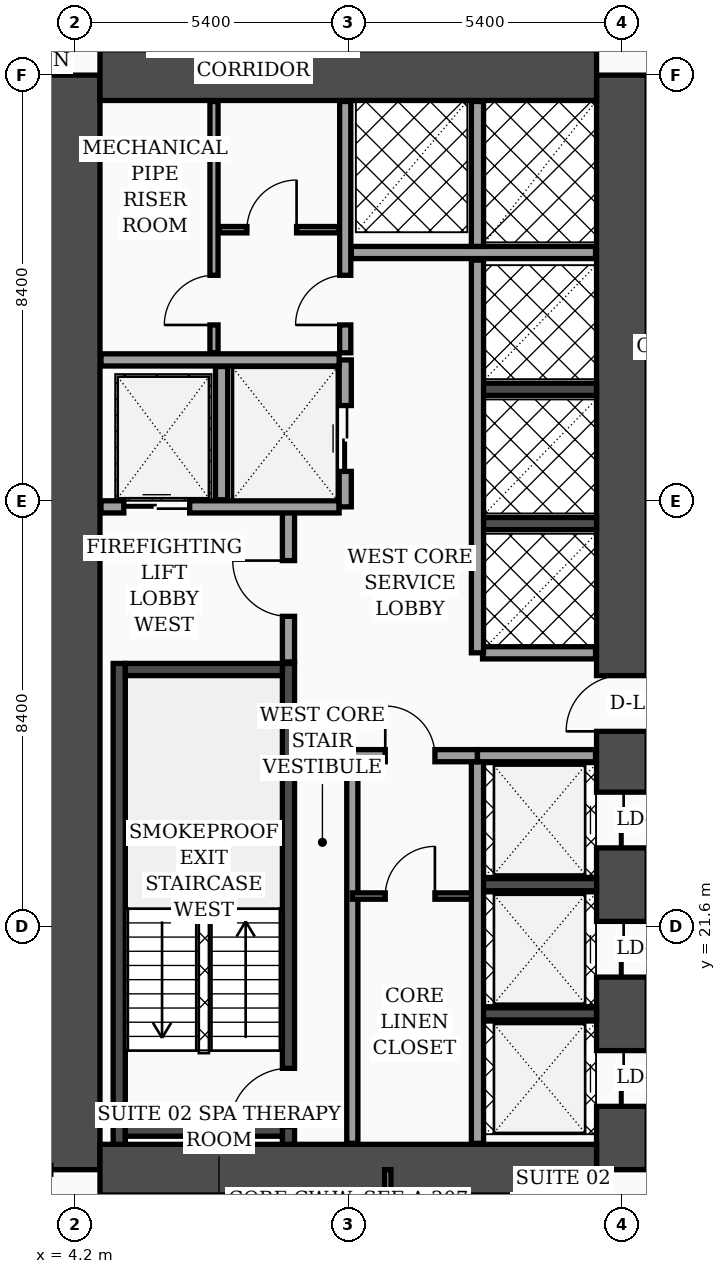
"""IFC4 building model, lengths in metres.
Left out: names, types, materials, properties, quantities, classifications, styles, units other than length and angle.
Written with IfcOpenShell. Run it as: python <this file> out.ifc"""

import sys

from ifc_helpers import new_model, si_unit, direction, frame, frame_2d, origin, place, context, subcontext, project, spatial, rectangle, extrude, element, fill, save


model = new_model("IFC4")
c1 = context("Model", 3, precision=1e-05, world=origin(), true_north=direction((0.0, 1.0)))
c2 = subcontext(c1, "Body", "Model", "MODEL_VIEW")
j1 = project(units=[si_unit("LENGTHUNIT", "METRE"), si_unit("PLANEANGLEUNIT", "RADIAN")], contexts=[c1])
p1 = place(None, origin())
s1 = spatial("IfcSite", under=j1, at=p1, CompositionType="ELEMENT")
p2 = place(p1, origin())
s2 = spatial("IfcBuilding", under=s1, at=p2, CompositionType="ELEMENT")
p3 = place(p2, frame((0.0, 0.0, 69.8)))
s3 = spatial("IfcBuildingStorey", under=s2, at=p3, CompositionType="ELEMENT", Elevation=69.8)
p4 = place(p3, frame((4.2, 16.8, 0.0), z_axis=(0.0, 0.0, 1.0), x_axis=(0.0, 1.0, 0.0)))
e1 = element("IfcWall", 1, at=p4, inside=s3, PredefinedType="SHEAR", context=c2, shape_type="SweptSolid", body=[
    extrude(rectangle(XDim=21.6, YDim=1.0, at=frame_2d((10.8, 0.0))), origin(), (0.0, 0.0, 1.0), 3.56),
])
p5 = place(p3, frame((15.0, 16.8, 0.0), z_axis=(0.0, 0.0, 1.0), x_axis=(0.0, 1.0, 0.0)))
e2 = element("IfcWall", 2, at=p5, inside=s3, PredefinedType="SHEAR", context=c2, shape_type="SweptSolid", body=[
    extrude(rectangle(XDim=21.6, YDim=1.0, at=frame_2d((10.8, 0.0))), origin(), (0.0, 0.0, 1.0), 3.56),
])
p6 = place(p5, frame((8.65, 0.0, 0.0)))
e3 = element("IfcOpeningElement", 3, at=p6, cuts=e2, PredefinedType="OPENING", context=c2, shape_type="SweptSolid", body=[
    extrude(rectangle(XDim=1.1, YDim=2.2, at=frame_2d((0.55, 1.1))), frame((0.0, 0.51, 0.0), z_axis=(0.0, -1.0, 0.0), x_axis=(1.0, 0.0, 0.0)), (0.0, 0.0, 1.0), 1.02),
])
p7 = place(p5, frame((1.25, 0.0, 0.0)))
e4 = element("IfcOpeningElement", 4, at=p7, cuts=e2, PredefinedType="OPENING", context=c2, shape_type="SweptSolid", body=[
    extrude(rectangle(XDim=1.1, YDim=2.2, at=frame_2d((0.55, 1.1))), frame((0.0, 0.51, 0.0), z_axis=(0.0, -1.0, 0.0), x_axis=(1.0, 0.0, 0.0)), (0.0, 0.0, 1.0), 1.02),
])
p8 = place(p5, frame((3.8, 0.0, 0.0)))
e5 = element("IfcOpeningElement", 5, at=p8, cuts=e2, PredefinedType="OPENING", context=c2, shape_type="SweptSolid", body=[
    extrude(rectangle(XDim=1.1, YDim=2.2, at=frame_2d((0.55, 1.1))), frame((0.0, 0.51, 0.0), z_axis=(0.0, -1.0, 0.0), x_axis=(1.0, 0.0, 0.0)), (0.0, 0.0, 1.0), 1.02),
])
p9 = place(p5, frame((6.35, 0.0, 0.0)))
e6 = element("IfcOpeningElement", 6, at=p9, cuts=e2, PredefinedType="OPENING", context=c2, shape_type="SweptSolid", body=[
    extrude(rectangle(XDim=1.1, YDim=2.2, at=frame_2d((0.55, 1.1))), frame((0.0, 0.51, 0.0), z_axis=(0.0, -1.0, 0.0), x_axis=(1.0, 0.0, 0.0)), (0.0, 0.0, 1.0), 1.02),
])
for number, where, z_axis, x_axis in (
    (7, (4.7, 38.4, 0.0), (0.0, 0.0, 1.0), (1.0, 0.0, 0.0)),
    (8, (4.7, 16.8, 0.0), (0.0, 0.0, 1.0), (1.0, 0.0, 0.0)),
):
    element("IfcWall", number, at=place(p3, frame(where, z_axis=z_axis, x_axis=x_axis)), inside=s3, PredefinedType="SHEAR", context=c2, shape_type="SweptSolid", body=[
        extrude(rectangle(XDim=9.8, YDim=1.0, at=frame_2d((4.9, 0.0))), origin(), (0.0, 0.0, 1.0), 3.56),
    ])
p10 = place(p3, frame((5.08, 17.3, 0.0), z_axis=(0.0, 0.0, 1.0), x_axis=(0.0, 1.0, 0.0)))
e9 = element("IfcWall", 9, at=p10, inside=s3, PredefinedType="SOLIDWALL", context=c2, shape_type="SweptSolid", body=[
    extrude(rectangle(XDim=9.49, YDim=0.24, at=frame_2d((4.745, 0.0))), origin(), (0.0, 0.0, 1.0), 3.56),
])
p11 = place(p3, frame((8.42, 17.3, 0.0), z_axis=(0.0, 0.0, 1.0), x_axis=(0.0, 1.0, 0.0)))
e10 = element("IfcWall", 10, at=p11, inside=s3, PredefinedType="SOLIDWALL", context=c2, shape_type="SweptSolid", body=[
    extrude(rectangle(XDim=9.49, YDim=0.24, at=frame_2d((4.745, 0.0))), origin(), (0.0, 0.0, 1.0), 3.56),
])
p12 = place(p11, frame((0.35, 0.0, 0.0)))
e11 = element("IfcOpeningElement", 11, at=p12, cuts=e10, PredefinedType="OPENING", context=c2, shape_type="SweptSolid", body=[
    extrude(rectangle(XDim=1.15, YDim=2.2, at=frame_2d((0.575, 1.1))), frame((0.0, 0.13, 0.0), z_axis=(0.0, -1.0, 0.0), x_axis=(1.0, 0.0, 0.0)), (0.0, 0.0, 1.0), 0.26),
])
for number, where, z_axis, x_axis in (
    (12, (5.2, 17.58, 0.0), (0.0, 0.0, 1.0), (1.0, 0.0, 0.0)),
    (13, (5.2, 26.67, 0.0), (0.0, 0.0, 1.0), (1.0, 0.0, 0.0)),
):
    element("IfcWall", number, at=place(p3, frame(where, z_axis=z_axis, x_axis=x_axis)), inside=s3, PredefinedType="SOLIDWALL", context=c2, shape_type="SweptSolid", body=[
        extrude(rectangle(XDim=3.1, YDim=0.24, at=frame_2d((1.55, 0.0))), origin(), (0.0, 0.0, 1.0), 3.56),
    ])
for number, where, z_axis, x_axis in (
    (14, (12.18, 19.875, 0.0), (0.0, 0.0, 1.0), (1.0, 0.0, 0.0)),
    (15, (12.18, 22.425, 0.0), (0.0, 0.0, 1.0), (1.0, 0.0, 0.0)),
    (16, (12.18, 29.55, 0.0), (0.0, 0.0, 1.0), (1.0, 0.0, 0.0)),
    (17, (12.18, 32.2, 0.0), (0.0, 0.0, 1.0), (1.0, 0.0, 0.0)),
):
    element("IfcWall", number, at=place(p3, frame(where, z_axis=z_axis, x_axis=x_axis)), inside=s3, PredefinedType="SOLIDWALL", context=c2, shape_type="SweptSolid", body=[
        extrude(rectangle(XDim=2.32, YDim=0.24, at=frame_2d((1.16, 0.0))), origin(), (0.0, 0.0, 1.0), 3.56),
    ])
p13 = place(p3, frame((8.42, 26.82, 0.0), z_axis=(0.0, 0.0, 1.0), x_axis=(0.0, 1.0, 0.0)))
e18 = element("IfcWall", 18, at=p13, inside=s3, PredefinedType="SOLIDWALL", context=c2, shape_type="SweptSolid", body=[
    extrude(rectangle(XDim=3.0, YDim=0.24, at=frame_2d((1.5, 0.0))), origin(), (0.0, 0.0, 1.0), 3.56),
])
p14 = place(p13, frame((0.9, 0.0, 0.0)))
e19 = element("IfcOpeningElement", 19, at=p14, cuts=e18, PredefinedType="OPENING", context=c2, shape_type="SweptSolid", body=[
    extrude(rectangle(XDim=1.1, YDim=2.2, at=frame_2d((0.55, 1.1))), frame((0.0, 0.13, 0.0), z_axis=(0.0, -1.0, 0.0), x_axis=(1.0, 0.0, 0.0)), (0.0, 0.0, 1.0), 0.26),
])
p15 = place(p3, frame((4.72, 29.88, 0.0), z_axis=(0.0, 0.0, 1.0), x_axis=(1.0, 0.0, 0.0)))
e20 = element("IfcWall", 20, at=p15, inside=s3, PredefinedType="SOLIDWALL", context=c2, shape_type="SweptSolid", body=[
    extrude(rectangle(XDim=4.7, YDim=0.24, at=frame_2d((2.35, 0.0))), origin(), (0.0, 0.0, 1.0), 3.56),
])
p16 = place(p15, frame((0.45, 0.0, 0.0)))
e21 = element("IfcOpeningElement", 21, at=p16, cuts=e20, PredefinedType="OPENING", context=c2, shape_type="SweptSolid", body=[
    extrude(rectangle(XDim=1.3, YDim=2.35, at=frame_2d((0.65, 1.175))), frame((0.0, 0.13, 0.0), z_axis=(0.0, -1.0, 0.0), x_axis=(1.0, 0.0, 0.0)), (0.0, 0.0, 1.0), 0.26),
])
p17 = place(p3, frame((7.1, 30.02, 0.0), z_axis=(0.0, 0.0, 1.0), x_axis=(0.0, 1.0, 0.0)))
e22 = element("IfcWall", 22, at=p17, inside=s3, PredefinedType="SOLIDWALL", context=c2, shape_type="SweptSolid", body=[
    extrude(rectangle(XDim=2.63, YDim=0.24, at=frame_2d((1.315, 0.0))), origin(), (0.0, 0.0, 1.0), 3.56),
])
p18 = place(p3, frame((9.54, 29.88, 0.0), z_axis=(0.0, 0.0, 1.0), x_axis=(0.0, 1.0, 0.0)))
e23 = element("IfcWall", 23, at=p18, inside=s3, PredefinedType="SOLIDWALL", context=c2, shape_type="SweptSolid", body=[
    extrude(rectangle(XDim=2.9, YDim=0.24, at=frame_2d((1.45, 0.0))), origin(), (0.0, 0.0, 1.0), 3.56),
])
p19 = place(p18, frame((0.7, 0.0, 0.0)))
e24 = element("IfcOpeningElement", 24, at=p19, cuts=e23, PredefinedType="OPENING", context=c2, shape_type="SweptSolid", body=[
    extrude(rectangle(XDim=1.3, YDim=2.35, at=frame_2d((0.65, 1.175))), frame((0.0, 0.13, 0.0), z_axis=(0.0, -1.0, 0.0), x_axis=(1.0, 0.0, 0.0)), (0.0, 0.0, 1.0), 0.26),
])
p20 = place(p3, frame((4.72, 32.78, 0.0), z_axis=(0.0, 0.0, 1.0), x_axis=(1.0, 0.0, 0.0)))
e25 = element("IfcWall", 25, at=p20, inside=s3, PredefinedType="SOLIDWALL", context=c2, shape_type="SweptSolid", body=[
    extrude(rectangle(XDim=4.7, YDim=0.24, at=frame_2d((2.35, 0.0))), origin(), (0.0, 0.0, 1.0), 3.56),
])
p21 = place(p3, frame((9.68, 17.32, 0.0), z_axis=(0.0, 0.0, 1.0), x_axis=(0.0, 1.0, 0.0)))
e26 = element("IfcWall", 26, at=p21, inside=s3, PredefinedType="SOLIDWALL", context=c2, shape_type="SweptSolid", body=[
    extrude(rectangle(XDim=7.68, YDim=0.22, at=frame_2d((3.84, 0.0))), origin(), (0.0, 0.0, 1.0), 3.56),
])
p22 = place(p3, frame((6.95, 32.92, 0.0), z_axis=(0.0, 0.0, 1.0), x_axis=(0.0, 1.0, 0.0)))
e27 = element("IfcWall", 27, at=p22, inside=s3, PredefinedType="PARTITIONING", context=c2, shape_type="SweptSolid", body=[
    extrude(rectangle(XDim=4.96, YDim=0.16, at=frame_2d((2.48, 0.0))), origin(), (0.0, 0.0, 1.0), 3.56),
])
p23 = place(p22, frame((0.55, 0.0, 0.0)))
e28 = element("IfcOpeningElement", 28, at=p23, cuts=e27, PredefinedType="OPENING", context=c2, shape_type="SweptSolid", body=[
    extrude(rectangle(XDim=0.98, YDim=2.15, at=frame_2d((0.49, 1.075))), frame((0.0, 0.09, 0.0), z_axis=(0.0, -1.0, 0.0), x_axis=(1.0, 0.0, 0.0)), (0.0, 0.0, 1.0), 0.18),
])
p24 = place(p3, frame((7.05, 35.35, 0.0), z_axis=(0.0, 0.0, 1.0), x_axis=(1.0, 0.0, 0.0)))
e29 = element("IfcWall", 29, at=p24, inside=s3, PredefinedType="PARTITIONING", context=c2, shape_type="SweptSolid", body=[
    extrude(rectangle(XDim=2.37, YDim=0.125, at=frame_2d((1.185, 0.0))), origin(), (0.0, 0.0, 1.0), 3.56),
])
p25 = place(p24, frame((0.55, 0.0, 0.0)))
e30 = element("IfcOpeningElement", 30, at=p25, cuts=e29, PredefinedType="OPENING", context=c2, shape_type="SweptSolid", body=[
    extrude(rectangle(XDim=0.98, YDim=2.15, at=frame_2d((0.49, 1.075))), frame((0.0, 0.073, 0.0), z_axis=(0.0, -1.0, 0.0), x_axis=(1.0, 0.0, 0.0)), (0.0, 0.0, 1.0), 0.145),
])
p26 = place(p3, frame((9.54, 32.92, 0.0), z_axis=(0.0, 0.0, 1.0), x_axis=(0.0, 1.0, 0.0)))
e31 = element("IfcWall", 31, at=p26, inside=s3, PredefinedType="SOLIDWALL", context=c2, shape_type="SweptSolid", body=[
    extrude(rectangle(XDim=4.96, YDim=0.22, at=frame_2d((2.48, 0.0))), origin(), (0.0, 0.0, 1.0), 3.56),
])
p27 = place(p26, frame((0.55, 0.0, 0.0)))
e32 = element("IfcOpeningElement", 32, at=p27, cuts=e31, PredefinedType="OPENING", context=c2, shape_type="SweptSolid", body=[
    extrude(rectangle(XDim=0.98, YDim=2.15, at=frame_2d((0.49, 1.075))), frame((0.0, 0.12, 0.0), z_axis=(0.0, -1.0, 0.0), x_axis=(1.0, 0.0, 0.0)), (0.0, 0.0, 1.0), 0.24),
])
p28 = place(p3, frame((9.68, 22.2, 0.0), z_axis=(0.0, 0.0, 1.0), x_axis=(1.0, 0.0, 0.0)))
e33 = element("IfcWall", 33, at=p28, inside=s3, PredefinedType="PARTITIONING", context=c2, shape_type="SweptSolid", body=[
    extrude(rectangle(XDim=2.47, YDim=0.125, at=frame_2d((1.235, 0.0))), origin(), (0.0, 0.0, 1.0), 3.56),
])
p29 = place(p28, frame((0.65, 0.0, 0.0)))
e34 = element("IfcOpeningElement", 34, at=p29, cuts=e33, PredefinedType="OPENING", context=c2, shape_type="SweptSolid", body=[
    extrude(rectangle(XDim=0.98, YDim=2.15, at=frame_2d((0.49, 1.075))), frame((0.0, 0.073, 0.0), z_axis=(0.0, -1.0, 0.0), x_axis=(1.0, 0.0, 0.0)), (0.0, 0.0, 1.0), 0.145),
])
p30 = place(p3, frame((12.15, 17.32, 0.0), z_axis=(0.0, 0.0, 1.0), x_axis=(0.0, 1.0, 0.0)))
e35 = element("IfcWall", 35, at=p30, inside=s3, PredefinedType="SOLIDWALL", context=c2, shape_type="SweptSolid", body=[
    extrude(rectangle(XDim=7.65, YDim=0.24, at=frame_2d((3.825, 0.0))), origin(), (0.0, 0.0, 1.0), 3.56),
])
p31 = place(p3, frame((9.68, 24.97, 0.0), z_axis=(0.0, 0.0, 1.0), x_axis=(1.0, 0.0, 0.0)))
e36 = element("IfcWall", 36, at=p31, inside=s3, PredefinedType="SOLIDWALL", context=c2, shape_type="SweptSolid", body=[
    extrude(rectangle(XDim=2.47, YDim=0.24, at=frame_2d((1.235, 0.0))), origin(), (0.0, 0.0, 1.0), 3.56),
])
p32 = place(p31, frame((0.65, 0.0, 0.0)))
e37 = element("IfcOpeningElement", 37, at=p32, cuts=e36, PredefinedType="OPENING", context=c2, shape_type="SweptSolid", body=[
    extrude(rectangle(XDim=0.98, YDim=2.15, at=frame_2d((0.49, 1.075))), frame((0.0, 0.13, 0.0), z_axis=(0.0, -1.0, 0.0), x_axis=(1.0, 0.0, 0.0)), (0.0, 0.0, 1.0), 0.26),
])
p33 = place(p3, frame((12.15, 24.97, 0.0), z_axis=(0.0, 0.0, 1.0), x_axis=(1.0, 0.0, 0.0)))
e38 = element("IfcWall", 38, at=p33, inside=s3, PredefinedType="SOLIDWALL", context=c2, shape_type="SweptSolid", body=[
    extrude(rectangle(XDim=2.33, YDim=0.24, at=frame_2d((1.165, 0.0))), origin(), (0.0, 0.0, 1.0), 2.84),
])
p34 = place(p3, frame((12.25, 27.0, 0.0), z_axis=(0.0, 0.0, 1.0), x_axis=(1.0, 0.0, 0.0)))
e39 = element("IfcWall", 39, at=p34, inside=s3, PredefinedType="SOLIDWALL", context=c2, shape_type="SweptSolid", body=[
    extrude(rectangle(XDim=2.23, YDim=0.24, at=frame_2d((1.115, 0.0))), origin(), (0.0, 0.0, 1.0), 3.56),
])
p35 = place(p3, frame((12.15, 27.0, 0.0), z_axis=(0.0, 0.0, 1.0), x_axis=(0.0, 1.0, 0.0)))
e40 = element("IfcWall", 40, at=p35, inside=s3, PredefinedType="SOLIDWALL", context=c2, shape_type="SweptSolid", body=[
    extrude(rectangle(XDim=7.75, YDim=0.24, at=frame_2d((3.875, 0.0))), origin(), (0.0, 0.0, 1.0), 3.56),
])
p36 = place(p3, frame((9.66, 34.9, 0.0), z_axis=(0.0, 0.0, 1.0), x_axis=(1.0, 0.0, 0.0)))
e41 = element("IfcWall", 41, at=p36, inside=s3, PredefinedType="SOLIDWALL", context=c2, shape_type="SweptSolid", body=[
    extrude(rectangle(XDim=4.82, YDim=0.24, at=frame_2d((2.41, 0.0))), origin(), (0.0, 0.0, 1.0), 3.56),
])
p37 = place(p3, frame((12.15, 35.02, 0.0), z_axis=(0.0, 0.0, 1.0), x_axis=(0.0, 1.0, 0.0)))
e42 = element("IfcWall", 42, at=p37, inside=s3, PredefinedType="SOLIDWALL", context=c2, shape_type="SweptSolid", body=[
    extrude(rectangle(XDim=2.86, YDim=0.24, at=frame_2d((1.43, 0.0))), origin(), (0.0, 0.0, 1.0), 3.56),
])
p38 = place(p3, frame((10.38, 14.71, 0.0), z_axis=(0.0, 0.0, 1.0), x_axis=(0.0, 1.0, 0.0)))
e43 = element("IfcWall", 43, at=p38, inside=s3, PredefinedType="PARTITIONING", context=c2, shape_type="SweptSolid", body=[
    extrude(rectangle(XDim=2.09, YDim=0.125, at=frame_2d((1.045, 0.0))), origin(), (0.0, 0.0, 1.0), 3.56),
])
p39 = place(p3, frame((13.3, 2.44, 0.0), z_axis=(0.0, 0.0, 1.0), x_axis=(0.0, 1.0, 0.0)))
e44 = element("IfcWall", 44, at=p39, inside=s3, PredefinedType="PARTITIONING", context=c2, shape_type="SweptSolid", body=[
    extrude(rectangle(XDim=14.36, YDim=0.18, at=frame_2d((7.18, 0.0))), origin(), (0.0, 0.0, 1.0), 3.04),
])
p40 = place(p39, frame((3.01, 0.0, 0.0)))
e45 = element("IfcOpeningElement", 45, at=p40, cuts=e44, PredefinedType="OPENING", context=c2, shape_type="SweptSolid", body=[
    extrude(rectangle(XDim=1.02, YDim=2.2, at=frame_2d((0.51, 1.1))), frame((0.0, 0.1, 0.0), z_axis=(0.0, -1.0, 0.0), x_axis=(1.0, 0.0, 0.0)), (0.0, 0.0, 1.0), 0.2),
])
p41 = place(p39, frame((9.03, 0.0, 0.0)))
e46 = element("IfcOpeningElement", 46, at=p41, cuts=e44, PredefinedType="OPENING", context=c2, shape_type="SweptSolid", body=[
    extrude(rectangle(XDim=1.02, YDim=2.2, at=frame_2d((0.51, 1.1))), frame((0.0, 0.1, 0.0), z_axis=(0.0, -1.0, 0.0), x_axis=(1.0, 0.0, 0.0)), (0.0, 0.0, 1.0), 0.2),
])
p42 = place(p14, origin())
e47 = element("IfcDoor", 47, at=p42, inside=s3, OperationType="SINGLE_SWING_RIGHT", PredefinedType="DOOR", context=c2, shape_type="SweptSolid", body=[
    extrude(rectangle(XDim=1.1, YDim=2.2, at=frame_2d((0.55, 1.1))), frame((0.0, 0.025, 0.0), z_axis=(0.0, -1.0, 0.0), x_axis=(1.0, 0.0, 0.0)), (0.0, 0.0, 1.0), 0.05),
])
fill(e19, e47)
p43 = place(p16, origin())
e48 = element("IfcDoor", 48, at=p43, inside=s3, OperationType="DOUBLE_DOOR_SLIDING", PredefinedType="DOOR", context=c2, shape_type="SweptSolid", body=[
    extrude(rectangle(XDim=1.3, YDim=2.35, at=frame_2d((0.65, 1.175))), frame((0.0, 0.025, 0.0), z_axis=(0.0, -1.0, 0.0), x_axis=(1.0, 0.0, 0.0)), (0.0, 0.0, 1.0), 0.05),
])
fill(e21, e48)
p44 = place(p19, origin())
e49 = element("IfcDoor", 49, at=p44, inside=s3, OperationType="DOUBLE_DOOR_SLIDING", PredefinedType="DOOR", context=c2, shape_type="SweptSolid", body=[
    extrude(rectangle(XDim=1.3, YDim=2.35, at=frame_2d((0.65, 1.175))), frame((0.0, 0.025, 0.0), z_axis=(0.0, -1.0, 0.0), x_axis=(1.0, 0.0, 0.0)), (0.0, 0.0, 1.0), 0.05),
])
fill(e24, e49)
p45 = place(p23, origin())
e50 = element("IfcDoor", 50, at=p45, inside=s3, OperationType="SINGLE_SWING_LEFT", PredefinedType="DOOR", context=c2, shape_type="SweptSolid", body=[
    extrude(rectangle(XDim=0.98, YDim=2.15, at=frame_2d((0.49, 1.075))), frame((0.0, 0.025, 0.0), z_axis=(0.0, -1.0, 0.0), x_axis=(1.0, 0.0, 0.0)), (0.0, 0.0, 1.0), 0.05),
])
fill(e28, e50)
p46 = place(p25, origin())
e51 = element("IfcDoor", 51, at=p46, inside=s3, OperationType="SINGLE_SWING_RIGHT", PredefinedType="DOOR", context=c2, shape_type="SweptSolid", body=[
    extrude(rectangle(XDim=0.98, YDim=2.15, at=frame_2d((0.49, 1.075))), frame((0.0, 0.025, 0.0), z_axis=(0.0, -1.0, 0.0), x_axis=(1.0, 0.0, 0.0)), (0.0, 0.0, 1.0), 0.05),
])
fill(e30, e51)
p47 = place(p27, origin())
e52 = element("IfcDoor", 52, at=p47, inside=s3, OperationType="SINGLE_SWING_LEFT", PredefinedType="DOOR", context=c2, shape_type="SweptSolid", body=[
    extrude(rectangle(XDim=0.98, YDim=2.15, at=frame_2d((0.49, 1.075))), frame((0.0, 0.025, 0.0), z_axis=(0.0, -1.0, 0.0), x_axis=(1.0, 0.0, 0.0)), (0.0, 0.0, 1.0), 0.05),
])
fill(e32, e52)
p48 = place(p29, origin())
e53 = element("IfcDoor", 53, at=p48, inside=s3, OperationType="SINGLE_SWING_RIGHT", PredefinedType="DOOR", context=c2, shape_type="SweptSolid", body=[
    extrude(rectangle(XDim=0.98, YDim=2.15, at=frame_2d((0.49, 1.075))), frame((0.0, 0.025, 0.0), z_axis=(0.0, -1.0, 0.0), x_axis=(1.0, 0.0, 0.0)), (0.0, 0.0, 1.0), 0.05),
])
fill(e34, e53)
p49 = place(p32, origin())
e54 = element("IfcDoor", 54, at=p49, inside=s3, OperationType="SINGLE_SWING_LEFT", PredefinedType="DOOR", context=c2, shape_type="SweptSolid", body=[
    extrude(rectangle(XDim=0.98, YDim=2.15, at=frame_2d((0.49, 1.075))), frame((0.0, 0.025, 0.0), z_axis=(0.0, -1.0, 0.0), x_axis=(1.0, 0.0, 0.0)), (0.0, 0.0, 1.0), 0.05),
])
fill(e37, e54)
p50 = place(p12, origin())
e55 = element("IfcDoor", 55, at=p50, inside=s3, OperationType="SINGLE_SWING_LEFT", PredefinedType="DOOR", context=c2, shape_type="SweptSolid", body=[
    extrude(rectangle(XDim=1.15, YDim=2.2, at=frame_2d((0.575, 1.1))), frame((0.0, 0.025, 0.0), z_axis=(0.0, -1.0, 0.0), x_axis=(1.0, 0.0, 0.0)), (0.0, 0.0, 1.0), 0.05),
])
fill(e11, e55)
p51 = place(p6, origin())
e56 = element("IfcDoor", 56, at=p51, inside=s3, OperationType="SINGLE_SWING_LEFT", PredefinedType="DOOR", context=c2, shape_type="SweptSolid", body=[
    extrude(rectangle(XDim=1.1, YDim=2.2, at=frame_2d((0.55, 1.1))), frame((0.0, 0.025, 0.0), z_axis=(0.0, -1.0, 0.0), x_axis=(1.0, 0.0, 0.0)), (0.0, 0.0, 1.0), 0.05),
])
fill(e3, e56)
p52 = place(p7, origin())
e57 = element("IfcDoor", 57, at=p52, inside=s3, OperationType="DOUBLE_DOOR_SLIDING", PredefinedType="DOOR", context=c2, shape_type="SweptSolid", body=[
    extrude(rectangle(XDim=1.1, YDim=2.2, at=frame_2d((0.55, 1.1))), frame((0.0, 0.025, 0.0), z_axis=(0.0, -1.0, 0.0), x_axis=(1.0, 0.0, 0.0)), (0.0, 0.0, 1.0), 0.05),
])
fill(e4, e57)
p53 = place(p8, origin())
e58 = element("IfcDoor", 58, at=p53, inside=s3, OperationType="DOUBLE_DOOR_SLIDING", PredefinedType="DOOR", context=c2, shape_type="SweptSolid", body=[
    extrude(rectangle(XDim=1.1, YDim=2.2, at=frame_2d((0.55, 1.1))), frame((0.0, 0.025, 0.0), z_axis=(0.0, -1.0, 0.0), x_axis=(1.0, 0.0, 0.0)), (0.0, 0.0, 1.0), 0.05),
])
fill(e5, e58)
p54 = place(p9, origin())
e59 = element("IfcDoor", 59, at=p54, inside=s3, OperationType="DOUBLE_DOOR_SLIDING", PredefinedType="DOOR", context=c2, shape_type="SweptSolid", body=[
    extrude(rectangle(XDim=1.1, YDim=2.2, at=frame_2d((0.55, 1.1))), frame((0.0, 0.025, 0.0), z_axis=(0.0, -1.0, 0.0), x_axis=(1.0, 0.0, 0.0)), (0.0, 0.0, 1.0), 0.05),
])
fill(e6, e59)
save(model, sys.argv[1])
